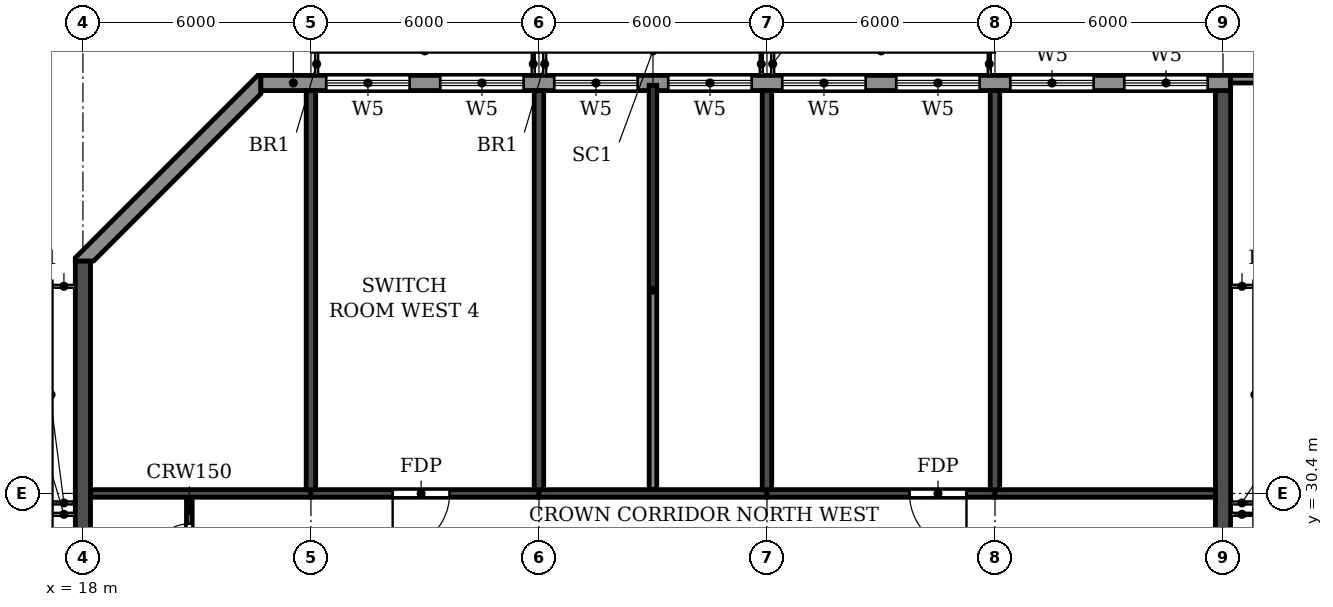
"""IFC4 building model, lengths in metres.
Left out: names, types, materials, properties, quantities, classifications, styles, units other than length and angle.
Written with IfcOpenShell. Run it as: python <this file> out.ifc"""

import sys

from ifc_helpers import new_model, si_unit, direction, frame, frame_2d, origin, place, context, subcontext, project, spatial, polyline, rectangle, outline, extrude, element, fill, save


model = new_model("IFC4")
c1 = context("Model", 3, precision=1e-05, world=origin(), true_north=direction((0.0, 1.0)))
c2 = subcontext(c1, "Body", "Model", "MODEL_VIEW")
j1 = project(units=[si_unit("LENGTHUNIT", "METRE"), si_unit("PLANEANGLEUNIT", "RADIAN")], contexts=[c1])
p1 = place(None, origin())
s1 = spatial("IfcSite", under=j1, at=p1, CompositionType="ELEMENT")
p2 = place(p1, origin())
s2 = spatial("IfcBuilding", under=s1, at=p2, CompositionType="ELEMENT")
p3 = place(p2, frame((0.0, 0.0, 272.4)))
s3 = spatial("IfcBuildingStorey", under=s2, at=p3, CompositionType="ELEMENT", Elevation=272.4)
for number, where, z_axis, x_axis in (
    (1, (24.0, 30.5, 0.0), (0.0, 0.0, 1.0), (0.0, 1.0, 0.0)),
    (2, (30.0, 30.5, 0.0), (0.0, 0.0, 1.0), (0.0, 1.0, 0.0)),
    (3, (36.0, 30.5, 0.0), (0.0, 0.0, 1.0), (0.0, 1.0, 0.0)),
    (4, (42.0, 30.5, 0.0), (0.0, 0.0, 1.0), (0.0, 1.0, 0.0)),
):
    element("IfcWall", number, at=place(p3, frame(where, z_axis=z_axis, x_axis=x_axis)), inside=s3, PredefinedType="SHEAR", context=c2, shape_type="SweptSolid", body=[
        extrude(rectangle(XDim=10.5, YDim=0.25, at=frame_2d((5.25, 0.0))), origin(), (0.0, 0.0, 1.0), 3.05),
    ])
p4 = place(p3, frame((18.0, 4.683, 0.0), z_axis=(0.0, 0.0, 1.0), x_axis=(0.0, 1.0, 0.0)))
e5 = element("IfcWall", 5, at=p4, inside=s3, PredefinedType="SHEAR", context=c2, shape_type="SweptSolid", body=[
    extrude(rectangle(XDim=31.834, YDim=0.4, at=frame_2d((15.917, 0.0))), origin(), (0.0, 0.0, 1.0), 3.05),
])
p5 = place(p3, frame((48.0, 0.2, 0.0), z_axis=(0.0, 0.0, 1.0), x_axis=(0.0, 1.0, 0.0)))
e6 = element("IfcWall", 6, at=p5, inside=s3, PredefinedType="SHEAR", context=c2, shape_type="SweptSolid", body=[
    extrude(rectangle(XDim=40.8, YDim=0.4, at=frame_2d((20.4, 0.0))), origin(), (0.0, 0.0, 1.0), 3.05),
])
p6 = place(p3, frame((18.2, 30.4, 0.0), z_axis=(0.0, 0.0, 1.0), x_axis=(1.0, 0.0, 0.0)))
e7 = element("IfcWall", 7, at=p6, inside=s3, PredefinedType="SHEAR", context=c2, shape_type="SweptSolid", body=[
    extrude(rectangle(XDim=5.8, YDim=0.2, at=frame_2d((2.9, 0.0))), origin(), (0.0, 0.0, 1.0), 2.45),
])
p7 = place(p3, frame((24.0, 30.4, 0.0), z_axis=(0.0, 0.0, 1.0), x_axis=(1.0, 0.0, 0.0)))
e8 = element("IfcWall", 8, at=p7, inside=s3, PredefinedType="SHEAR", context=c2, shape_type="SweptSolid", body=[
    extrude(rectangle(XDim=6.0, YDim=0.2, at=frame_2d((3.0, 0.0))), origin(), (0.0, 0.0, 1.0), 2.45),
])
p8 = place(p7, frame((2.15, 0.0, 0.0)))
e9 = element("IfcOpeningElement", 9, at=p8, cuts=e8, PredefinedType="OPENING", context=c2, shape_type="SweptSolid", body=[
    extrude(rectangle(XDim=1.5, YDim=2.1, at=frame_2d((0.75, 1.05))), frame((0.0, 0.11, 0.0), z_axis=(0.0, -1.0, 0.0), x_axis=(1.0, 0.0, 0.0)), (0.0, 0.0, 1.0), 0.22),
])
p9 = place(p3, frame((30.0, 30.4, 0.0), z_axis=(0.0, 0.0, 1.0), x_axis=(1.0, 0.0, 0.0)))
e10 = element("IfcWall", 10, at=p9, inside=s3, PredefinedType="SHEAR", context=c2, shape_type="SweptSolid", body=[
    extrude(rectangle(XDim=6.0, YDim=0.2, at=frame_2d((3.0, 0.0))), origin(), (0.0, 0.0, 1.0), 2.45),
])
p10 = place(p3, frame((36.0, 30.4, 0.0), z_axis=(0.0, 0.0, 1.0), x_axis=(1.0, 0.0, 0.0)))
e11 = element("IfcWall", 11, at=p10, inside=s3, PredefinedType="SHEAR", context=c2, shape_type="SweptSolid", body=[
    extrude(rectangle(XDim=6.0, YDim=0.2, at=frame_2d((3.0, 0.0))), origin(), (0.0, 0.0, 1.0), 2.45),
])
p11 = place(p10, frame((3.75, 0.0, 0.0)))
e12 = element("IfcOpeningElement", 12, at=p11, cuts=e11, PredefinedType="OPENING", context=c2, shape_type="SweptSolid", body=[
    extrude(rectangle(XDim=1.5, YDim=2.1, at=frame_2d((0.75, 1.05))), frame((0.0, 0.11, 0.0), z_axis=(0.0, -1.0, 0.0), x_axis=(1.0, 0.0, 0.0)), (0.0, 0.0, 1.0), 0.22),
])
p12 = place(p3, frame((42.0, 30.4, 0.0), z_axis=(0.0, 0.0, 1.0), x_axis=(1.0, 0.0, 0.0)))
e13 = element("IfcWall", 13, at=p12, inside=s3, PredefinedType="SHEAR", context=c2, shape_type="SweptSolid", body=[
    extrude(rectangle(XDim=5.8, YDim=0.2, at=frame_2d((2.9, 0.0))), origin(), (0.0, 0.0, 1.0), 2.45),
])
p13 = place(p3, frame((48.2, 41.2, 0.0), z_axis=(0.0, 0.0, 1.0), x_axis=(-1.0, 0.0, 0.0)))
e14 = element("IfcWall", 14, at=p13, inside=s3, PredefinedType="STANDARD", context=c2, shape_type="SweptSolid", body=[
    extrude(rectangle(XDim=25.517, YDim=0.4, at=frame_2d((12.759, 0.0))), origin(), (0.0, 0.0, 1.0), 3.05),
])
p14 = place(p13, frame((21.6, 0.0, 0.6)))
e15 = element("IfcOpeningElement", 15, at=p14, cuts=e14, PredefinedType="OPENING", context=c2, shape_type="SweptSolid", body=[
    extrude(rectangle(XDim=2.2, YDim=2.4, at=frame_2d((1.1, 1.2))), frame((0.0, 0.21, 0.0), z_axis=(0.0, -1.0, 0.0), x_axis=(1.0, 0.0, 0.0)), (0.0, 0.0, 1.0), 0.42),
])
p15 = place(p13, frame((18.6, 0.0, 0.6)))
e16 = element("IfcOpeningElement", 16, at=p15, cuts=e14, PredefinedType="OPENING", context=c2, shape_type="SweptSolid", body=[
    extrude(rectangle(XDim=2.2, YDim=2.4, at=frame_2d((1.1, 1.2))), frame((0.0, 0.21, 0.0), z_axis=(0.0, -1.0, 0.0), x_axis=(1.0, 0.0, 0.0)), (0.0, 0.0, 1.0), 0.42),
])
p16 = place(p13, frame((15.6, 0.0, 0.6)))
e17 = element("IfcOpeningElement", 17, at=p16, cuts=e14, PredefinedType="OPENING", context=c2, shape_type="SweptSolid", body=[
    extrude(rectangle(XDim=2.2, YDim=2.4, at=frame_2d((1.1, 1.2))), frame((0.0, 0.21, 0.0), z_axis=(0.0, -1.0, 0.0), x_axis=(1.0, 0.0, 0.0)), (0.0, 0.0, 1.0), 0.42),
])
p17 = place(p13, frame((12.6, 0.0, 0.6)))
e18 = element("IfcOpeningElement", 18, at=p17, cuts=e14, PredefinedType="OPENING", context=c2, shape_type="SweptSolid", body=[
    extrude(rectangle(XDim=2.2, YDim=2.4, at=frame_2d((1.1, 1.2))), frame((0.0, 0.21, 0.0), z_axis=(0.0, -1.0, 0.0), x_axis=(1.0, 0.0, 0.0)), (0.0, 0.0, 1.0), 0.42),
])
p18 = place(p13, frame((9.6, 0.0, 0.6)))
e19 = element("IfcOpeningElement", 19, at=p18, cuts=e14, PredefinedType="OPENING", context=c2, shape_type="SweptSolid", body=[
    extrude(rectangle(XDim=2.2, YDim=2.4, at=frame_2d((1.1, 1.2))), frame((0.0, 0.21, 0.0), z_axis=(0.0, -1.0, 0.0), x_axis=(1.0, 0.0, 0.0)), (0.0, 0.0, 1.0), 0.42),
])
p19 = place(p13, frame((6.6, 0.0, 0.6)))
e20 = element("IfcOpeningElement", 20, at=p19, cuts=e14, PredefinedType="OPENING", context=c2, shape_type="SweptSolid", body=[
    extrude(rectangle(XDim=2.2, YDim=2.4, at=frame_2d((1.1, 1.2))), frame((0.0, 0.21, 0.0), z_axis=(0.0, -1.0, 0.0), x_axis=(1.0, 0.0, 0.0)), (0.0, 0.0, 1.0), 0.42),
])
p20 = place(p13, frame((3.6, 0.0, 0.6)))
e21 = element("IfcOpeningElement", 21, at=p20, cuts=e14, PredefinedType="OPENING", context=c2, shape_type="SweptSolid", body=[
    extrude(rectangle(XDim=2.2, YDim=2.4, at=frame_2d((1.1, 1.2))), frame((0.0, 0.21, 0.0), z_axis=(0.0, -1.0, 0.0), x_axis=(1.0, 0.0, 0.0)), (0.0, 0.0, 1.0), 0.42),
])
p21 = place(p13, frame((0.6, 0.0, 0.6)))
e22 = element("IfcOpeningElement", 22, at=p21, cuts=e14, PredefinedType="OPENING", context=c2, shape_type="SweptSolid", body=[
    extrude(rectangle(XDim=2.2, YDim=2.4, at=frame_2d((1.1, 1.2))), frame((0.0, 0.21, 0.0), z_axis=(0.0, -1.0, 0.0), x_axis=(1.0, 0.0, 0.0)), (0.0, 0.0, 1.0), 0.42),
])
p22 = place(p3, origin())
e23 = element("IfcWall", 23, at=p22, inside=s3, PredefinedType="STANDARD", context=c2, shape_type="SweptSolid", body=[
    extrude(outline(polyline([(22.683, 41.4), (22.6, 41.4), (17.8, 36.6), (17.8, 36.517), (18.283, 36.517), (22.683, 40.917), (22.683, 41.4)])), origin(), (0.0, 0.0, 1.0), 3.05),
])
p23 = place(p3, origin())
e24 = element("IfcWall", 24, at=p23, inside=s3, PredefinedType="PARAPET", context=c2, shape_type="SweptSolid", body=[
    extrude(outline(polyline([(48.2, 41.4), (48.2, 41.2), (53.8, 41.2), (53.8, 41.4), (48.2, 41.4)])), origin(), (0.0, 0.0, 1.0), 1.1),
])
p24 = place(p3, frame((20.8, 27.9, 0.0), z_axis=(0.0, 0.0, 1.0), x_axis=(0.0, 1.0, 0.0)))
e25 = element("IfcWall", 25, at=p24, inside=s3, PredefinedType="PARTITIONING", context=c2, shape_type="SweptSolid", body=[
    extrude(rectangle(XDim=2.39, YDim=0.15, at=frame_2d((1.195, 0.0))), origin(), (0.0, 0.0, 1.0), 3.05),
])
p25 = place(p24, frame((0.7, 0.0, 0.0)))
e26 = element("IfcOpeningElement", 26, at=p25, cuts=e25, PredefinedType="OPENING", context=c2, shape_type="SweptSolid", body=[
    extrude(rectangle(XDim=1.0, YDim=2.1, at=frame_2d((0.5, 1.05))), frame((0.0, 0.085, 0.0), z_axis=(0.0, -1.0, 0.0), x_axis=(1.0, 0.0, 0.0)), (0.0, 0.0, 1.0), 0.17),
])
p26 = place(p3, frame((33.0, 30.51, 0.0), z_axis=(0.0, 0.0, 1.0), x_axis=(0.0, 1.0, 0.0)))
e27 = element("IfcWall", 27, at=p26, inside=s3, PredefinedType="PARTITIONING", context=c2, shape_type="SweptSolid", body=[
    extrude(rectangle(XDim=10.63, YDim=0.2, at=frame_2d((5.315, 0.0))), origin(), (0.0, 0.0, 1.0), 3.05),
])
p27 = place(p14, origin())
e28 = element("IfcWindow", 28, at=p27, inside=s3, PartitioningType="TRIPLE_PANEL_HORIZONTAL", PredefinedType="WINDOW", context=c2, shape_type="SweptSolid", body=[
    extrude(rectangle(XDim=2.2, YDim=2.4, at=frame_2d((1.1, 1.2))), frame((0.0, 0.03, 0.0), z_axis=(0.0, -1.0, 0.0), x_axis=(1.0, 0.0, 0.0)), (0.0, 0.0, 1.0), 0.06),
])
fill(e15, e28)
p28 = place(p15, origin())
e29 = element("IfcWindow", 29, at=p28, inside=s3, PartitioningType="TRIPLE_PANEL_HORIZONTAL", PredefinedType="WINDOW", context=c2, shape_type="SweptSolid", body=[
    extrude(rectangle(XDim=2.2, YDim=2.4, at=frame_2d((1.1, 1.2))), frame((0.0, 0.03, 0.0), z_axis=(0.0, -1.0, 0.0), x_axis=(1.0, 0.0, 0.0)), (0.0, 0.0, 1.0), 0.06),
])
fill(e16, e29)
p29 = place(p16, origin())
e30 = element("IfcWindow", 30, at=p29, inside=s3, PartitioningType="TRIPLE_PANEL_HORIZONTAL", PredefinedType="WINDOW", context=c2, shape_type="SweptSolid", body=[
    extrude(rectangle(XDim=2.2, YDim=2.4, at=frame_2d((1.1, 1.2))), frame((0.0, 0.03, 0.0), z_axis=(0.0, -1.0, 0.0), x_axis=(1.0, 0.0, 0.0)), (0.0, 0.0, 1.0), 0.06),
])
fill(e17, e30)
p30 = place(p17, origin())
e31 = element("IfcWindow", 31, at=p30, inside=s3, PartitioningType="TRIPLE_PANEL_HORIZONTAL", PredefinedType="WINDOW", context=c2, shape_type="SweptSolid", body=[
    extrude(rectangle(XDim=2.2, YDim=2.4, at=frame_2d((1.1, 1.2))), frame((0.0, 0.03, 0.0), z_axis=(0.0, -1.0, 0.0), x_axis=(1.0, 0.0, 0.0)), (0.0, 0.0, 1.0), 0.06),
])
fill(e18, e31)
p31 = place(p18, origin())
e32 = element("IfcWindow", 32, at=p31, inside=s3, PartitioningType="TRIPLE_PANEL_HORIZONTAL", PredefinedType="WINDOW", context=c2, shape_type="SweptSolid", body=[
    extrude(rectangle(XDim=2.2, YDim=2.4, at=frame_2d((1.1, 1.2))), frame((0.0, 0.03, 0.0), z_axis=(0.0, -1.0, 0.0), x_axis=(1.0, 0.0, 0.0)), (0.0, 0.0, 1.0), 0.06),
])
fill(e19, e32)
p32 = place(p19, origin())
e33 = element("IfcWindow", 33, at=p32, inside=s3, PartitioningType="TRIPLE_PANEL_HORIZONTAL", PredefinedType="WINDOW", context=c2, shape_type="SweptSolid", body=[
    extrude(rectangle(XDim=2.2, YDim=2.4, at=frame_2d((1.1, 1.2))), frame((0.0, 0.03, 0.0), z_axis=(0.0, -1.0, 0.0), x_axis=(1.0, 0.0, 0.0)), (0.0, 0.0, 1.0), 0.06),
])
fill(e20, e33)
p33 = place(p20, origin())
e34 = element("IfcWindow", 34, at=p33, inside=s3, PartitioningType="TRIPLE_PANEL_HORIZONTAL", PredefinedType="WINDOW", context=c2, shape_type="SweptSolid", body=[
    extrude(rectangle(XDim=2.2, YDim=2.4, at=frame_2d((1.1, 1.2))), frame((0.0, 0.03, 0.0), z_axis=(0.0, -1.0, 0.0), x_axis=(1.0, 0.0, 0.0)), (0.0, 0.0, 1.0), 0.06),
])
fill(e21, e34)
p34 = place(p21, origin())
e35 = element("IfcWindow", 35, at=p34, inside=s3, PartitioningType="TRIPLE_PANEL_HORIZONTAL", PredefinedType="WINDOW", context=c2, shape_type="SweptSolid", body=[
    extrude(rectangle(XDim=2.2, YDim=2.4, at=frame_2d((1.1, 1.2))), frame((0.0, 0.03, 0.0), z_axis=(0.0, -1.0, 0.0), x_axis=(1.0, 0.0, 0.0)), (0.0, 0.0, 1.0), 0.06),
])
fill(e22, e35)
p35 = place(p8, frame((1.5, 0.0, 0.0), z_axis=(0.0, 0.0, 1.0), x_axis=(-1.0, 0.0, 0.0)))
e36 = element("IfcDoor", 36, at=p35, inside=s3, OperationType="DOUBLE_DOOR_SINGLE_SWING", PredefinedType="DOOR", context=c2, shape_type="SweptSolid", body=[
    extrude(rectangle(XDim=1.5, YDim=2.1, at=frame_2d((0.75, 1.05))), frame((0.0, 0.025, 0.0), z_axis=(0.0, -1.0, 0.0), x_axis=(1.0, 0.0, 0.0)), (0.0, 0.0, 1.0), 0.05),
])
fill(e9, e36)
p36 = place(p11, frame((1.5, 0.0, 0.0), z_axis=(0.0, 0.0, 1.0), x_axis=(-1.0, 0.0, 0.0)))
e37 = element("IfcDoor", 37, at=p36, inside=s3, OperationType="DOUBLE_DOOR_SINGLE_SWING", PredefinedType="DOOR", context=c2, shape_type="SweptSolid", body=[
    extrude(rectangle(XDim=1.5, YDim=2.1, at=frame_2d((0.75, 1.05))), frame((0.0, 0.025, 0.0), z_axis=(0.0, -1.0, 0.0), x_axis=(1.0, 0.0, 0.0)), (0.0, 0.0, 1.0), 0.05),
])
fill(e12, e37)
p37 = place(p25, origin())
e38 = element("IfcDoor", 38, at=p37, inside=s3, OperationType="SINGLE_SWING_LEFT", PredefinedType="DOOR", context=c2, shape_type="SweptSolid", body=[
    extrude(rectangle(XDim=1.0, YDim=2.1, at=frame_2d((0.5, 1.05))), frame((0.0, 0.025, 0.0), z_axis=(0.0, -1.0, 0.0), x_axis=(1.0, 0.0, 0.0)), (0.0, 0.0, 1.0), 0.05),
])
fill(e26, e38)
save(model, sys.argv[1])
